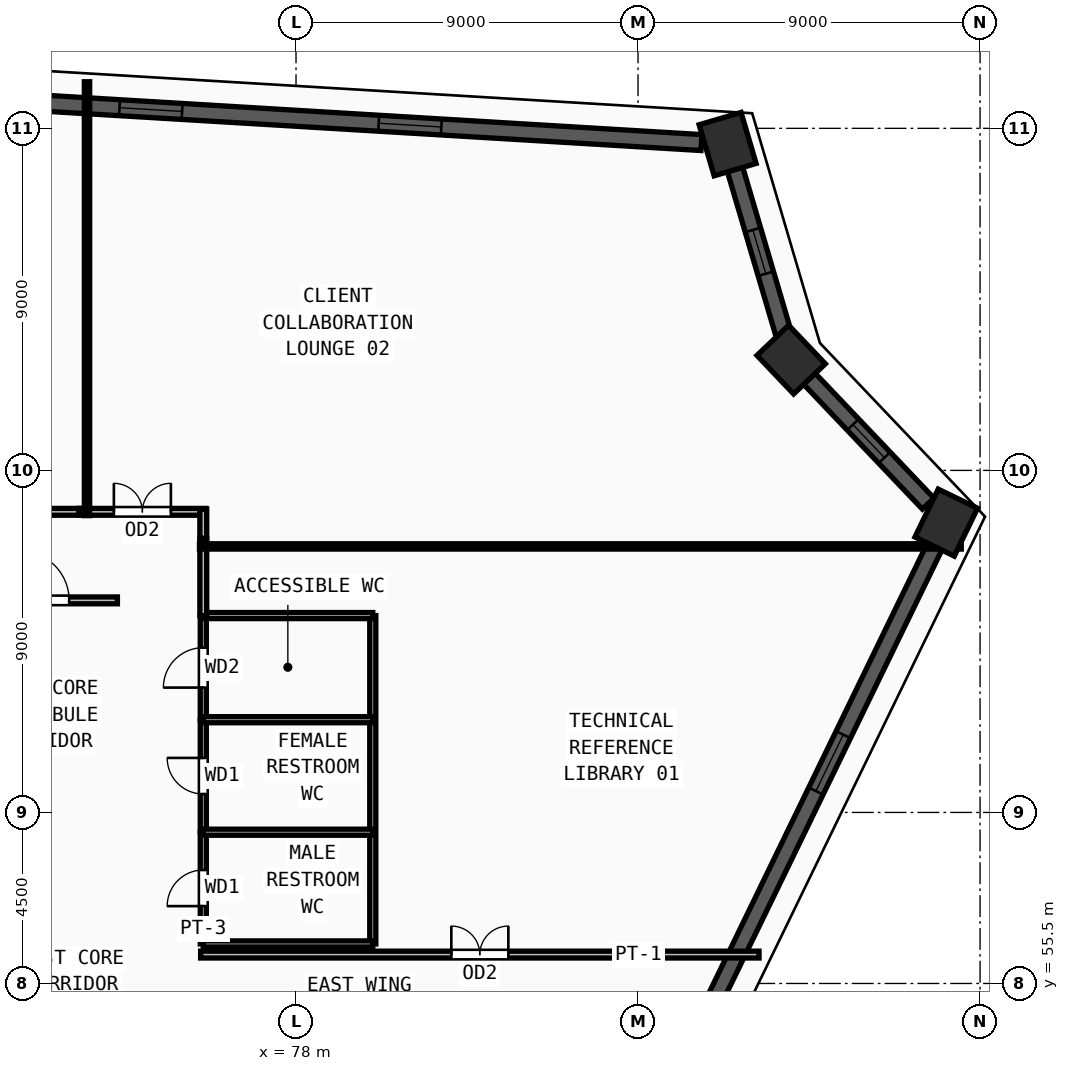
"""IFC4 building model, lengths in metres.
Left out: names, types, materials, properties, quantities, classifications, styles, units other than length and angle.
Written with IfcOpenShell. Run it as: python <this file> out.ifc"""

import sys

from ifc_helpers import new_model, si_unit, direction, frame, frame_2d, origin, origin_2d, place, context, subcontext, project, spatial, rectangle, extrude, source, transform, mapped, element, fill, save


model = new_model("IFC4")
c1 = context("Model", 3, precision=1e-05, world=origin(), true_north=direction((0.0, 1.0)))
c2 = subcontext(c1, "Body", "Model", "MODEL_VIEW")
j1 = project(units=[si_unit("LENGTHUNIT", "METRE"), si_unit("PLANEANGLEUNIT", "RADIAN")], contexts=[c1])
p1 = place(None, origin())
s1 = spatial("IfcSite", under=j1, at=p1, CompositionType="ELEMENT")
p2 = place(p1, origin())
s2 = spatial("IfcBuilding", under=s1, at=p2, CompositionType="ELEMENT")
p3 = place(p2, frame((0.0, 0.0, 155.25)))
s3 = spatial("IfcBuildingStorey", under=s2, at=p3, CompositionType="ELEMENT", Elevation=155.25)
m1 = source(origin(), c2, "Body", "SweptSolid", [
    extrude(rectangle(XDim=1.4, YDim=1.15, at=origin_2d()), origin(), (0.0, 0.0, 1.0), 3.75),
])
for number, where, z_axis, x_axis in (
    (1, (89.357, 77.585, 0.0), (0.0, 0.0, 1.0), (-0.283, 0.959, 0.0)),
    (2, (91.029, 71.915, 0.0), (0.0, 0.0, 1.0), (-0.689, 0.724, 0.0)),
    (3, (95.11, 67.626, 0.0), (0.0, 0.0, 1.0), (0.437, 0.9, 0.0)),
):
    element("IfcColumn", number, at=place(p3, frame(where, z_axis=z_axis, x_axis=x_axis)), inside=s3, PredefinedType="COLUMN", context=c2, shape_type="MappedRepresentation", body=[
        mapped(m1, transform((0.0, 0.0, 0.0), x_axis=(1.0, 0.0, 0.0), y_axis=(0.0, 1.0, 0.0), z_axis=(0.0, 0.0, 1.0), scale=1.0)),
    ])
p4 = place(p3, frame((83.737, 44.203, 0.0), z_axis=(0.0, 0.0, 1.0), x_axis=(0.436800646479, 0.899558333426, 0.0)))
e4 = element("IfcWall", 4, at=p4, inside=s3, PredefinedType="SOLIDWALL", context=c2, shape_type="SweptSolid", body=[
    extrude(rectangle(XDim=25.348, YDim=0.42, at=frame_2d((12.674, 0.0))), origin(), (0.0, 0.0, 1.0), 3.57),
])
m2 = source(origin(), c2, "Body", "SweptSolid", [
    extrude(rectangle(XDim=1.65, YDim=1.95, at=frame_2d((0.825, 0.975))), frame((0.0, 0.22, 0.0), z_axis=(0.0, -1.0, 0.0), x_axis=(1.0, 0.0, 0.0)), (0.0, 0.0, 1.0), 0.44),
])
p5 = place(p4, frame((5.512, 0.0, 0.55)))
e5 = element("IfcOpeningElement", 5, at=p5, cuts=e4, PredefinedType="OPENING", context=c2, shape_type="MappedRepresentation", body=[
    mapped(m2, transform((0.0, 0.0, 0.0), x_axis=(1.0, 0.0, 0.0), y_axis=(0.0, 1.0, 0.0), z_axis=(0.0, 0.0, 1.0), scale=1.0)),
])
p6 = place(p4, frame((18.186, 0.0, 0.55)))
e6 = element("IfcOpeningElement", 6, at=p6, cuts=e4, PredefinedType="OPENING", context=c2, shape_type="MappedRepresentation", body=[
    mapped(m2, transform((0.0, 0.0, 0.0), x_axis=(1.0, 0.0, 0.0), y_axis=(0.0, 1.0, 0.0), z_axis=(0.0, 0.0, 1.0), scale=1.0)),
])
p7 = place(p3, frame((94.634, 68.126, 0.0), z_axis=(0.0, 0.0, 1.0), x_axis=(-0.68927504917, 0.724499763003, 0.0)))
e7 = element("IfcWall", 7, at=p7, inside=s3, PredefinedType="SOLIDWALL", context=c2, shape_type="SweptSolid", body=[
    extrude(rectangle(XDim=4.54, YDim=0.42, at=frame_2d((2.27, 0.0))), origin(), (0.0, 0.0, 1.0), 3.57),
])
m3 = source(origin(), c2, "Body", "SweptSolid", [
    extrude(rectangle(XDim=1.2, YDim=1.9, at=frame_2d((0.6, 0.95))), frame((0.0, 0.22, 0.0), z_axis=(0.0, -1.0, 0.0), x_axis=(1.0, 0.0, 0.0)), (0.0, 0.0, 1.0), 0.44),
])
p8 = place(p7, frame((1.67, 0.0, 0.55)))
e8 = element("IfcOpeningElement", 8, at=p8, cuts=e7, PredefinedType="OPENING", context=c2, shape_type="MappedRepresentation", body=[
    mapped(m3, transform((0.0, 0.0, 0.0), x_axis=(1.0, 0.0, 0.0), y_axis=(0.0, 1.0, 0.0), z_axis=(0.0, 0.0, 1.0), scale=1.0)),
])
p9 = place(p3, frame((90.834, 72.577, 0.0), z_axis=(0.0, 0.0, 1.0), x_axis=(-0.282915903715, 0.959144718708, 0.0)))
e9 = element("IfcWall", 9, at=p9, inside=s3, PredefinedType="SOLIDWALL", context=c2, shape_type="SweptSolid", body=[
    extrude(rectangle(XDim=4.531, YDim=0.42, at=frame_2d((2.266, 0.0))), origin(), (0.0, 0.0, 1.0), 3.57),
])
p10 = place(p9, frame((1.666, 0.0, 0.55)))
e10 = element("IfcOpeningElement", 10, at=p10, cuts=e9, PredefinedType="OPENING", context=c2, shape_type="MappedRepresentation", body=[
    mapped(m3, transform((0.0, 0.0, 0.0), x_axis=(1.0, 0.0, 0.0), y_axis=(0.0, 1.0, 0.0), z_axis=(0.0, 0.0, 1.0), scale=1.0)),
])
p11 = place(p3, frame((88.668, 77.626, 0.0), z_axis=(0.0, 0.0, 1.0), x_axis=(-0.998209336024, 0.059817401095, 0.0)))
e11 = element("IfcWall", 11, at=p11, inside=s3, PredefinedType="SOLIDWALL", context=c2, shape_type="SweptSolid", body=[
    extrude(rectangle(XDim=30.729, YDim=0.42, at=frame_2d((15.365, 0.0))), origin(), (0.0, 0.0, 1.0), 3.57),
])
p12 = place(p11, frame((6.857, 0.0, 0.55)))
e12 = element("IfcOpeningElement", 12, at=p12, cuts=e11, PredefinedType="OPENING", context=c2, shape_type="MappedRepresentation", body=[
    mapped(m2, transform((0.0, 0.0, 0.0), x_axis=(1.0, 0.0, 0.0), y_axis=(0.0, 1.0, 0.0), z_axis=(0.0, 0.0, 1.0), scale=1.0)),
])
p13 = place(p11, frame((13.69, 0.0, 0.55)))
e13 = element("IfcOpeningElement", 13, at=p13, cuts=e11, PredefinedType="OPENING", context=c2, shape_type="MappedRepresentation", body=[
    mapped(m2, transform((0.0, 0.0, 0.0), x_axis=(1.0, 0.0, 0.0), y_axis=(0.0, 1.0, 0.0), z_axis=(0.0, 0.0, 1.0), scale=1.0)),
])
p14 = place(p11, frame((20.672, 0.0, 0.55)))
e14 = element("IfcOpeningElement", 14, at=p14, cuts=e11, PredefinedType="OPENING", context=c2, shape_type="MappedRepresentation", body=[
    mapped(m2, transform((0.0, 0.0, 0.0), x_axis=(1.0, 0.0, 0.0), y_axis=(0.0, 1.0, 0.0), z_axis=(0.0, 0.0, 1.0), scale=1.0)),
])
p15 = place(p3, frame((75.56, 56.54, 0.0), z_axis=(0.0, 0.0, 1.0), x_axis=(0.0, 1.0, 0.0)))
e15 = element("IfcWall", 15, at=p15, inside=s3, PredefinedType="PARTITIONING", context=c2, shape_type="SweptSolid", body=[
    extrude(rectangle(XDim=2.94, YDim=0.16, at=frame_2d((1.47, 0.0))), origin(), (0.0, 0.0, 1.0), 3.57),
])
m4 = source(origin(), c2, "Body", "SweptSolid", [
    extrude(rectangle(XDim=0.95, YDim=2.15, at=frame_2d((0.475, 1.075))), frame((0.0, 0.09, 0.0), z_axis=(0.0, -1.0, 0.0), x_axis=(1.0, 0.0, 0.0)), (0.0, 0.0, 1.0), 0.18),
])
p16 = place(p15, frame((0.995, 0.0, 0.0)))
e16 = element("IfcOpeningElement", 16, at=p16, cuts=e15, PredefinedType="OPENING", context=c2, shape_type="MappedRepresentation", body=[
    mapped(m4, transform((0.0, 0.0, 0.0), x_axis=(1.0, 0.0, 0.0), y_axis=(0.0, 1.0, 0.0), z_axis=(0.0, 0.0, 1.0), scale=1.0)),
])
p17 = place(p3, frame((75.56, 59.48, 0.0), z_axis=(0.0, 0.0, 1.0), x_axis=(0.0, 1.0, 0.0)))
e17 = element("IfcWall", 17, at=p17, inside=s3, PredefinedType="PARTITIONING", context=c2, shape_type="SweptSolid", body=[
    extrude(rectangle(XDim=2.96, YDim=0.16, at=frame_2d((1.48, 0.0))), origin(), (0.0, 0.0, 1.0), 3.57),
])
p18 = place(p17, frame((1.005, 0.0, 0.0)))
e18 = element("IfcOpeningElement", 18, at=p18, cuts=e17, PredefinedType="OPENING", context=c2, shape_type="MappedRepresentation", body=[
    mapped(m4, transform((0.0, 0.0, 0.0), x_axis=(1.0, 0.0, 0.0), y_axis=(0.0, 1.0, 0.0), z_axis=(0.0, 0.0, 1.0), scale=1.0)),
])
p19 = place(p3, frame((75.56, 62.44, 0.0), z_axis=(0.0, 0.0, 1.0), x_axis=(0.0, 1.0, 0.0)))
e19 = element("IfcWall", 19, at=p19, inside=s3, PredefinedType="PARTITIONING", context=c2, shape_type="SweptSolid", body=[
    extrude(rectangle(XDim=2.74, YDim=0.16, at=frame_2d((1.37, 0.0))), origin(), (0.0, 0.0, 1.0), 3.57),
])
m5 = source(origin(), c2, "Body", "SweptSolid", [
    extrude(rectangle(XDim=1.05, YDim=2.15, at=frame_2d((0.525, 1.075))), frame((0.0, 0.09, 0.0), z_axis=(0.0, -1.0, 0.0), x_axis=(1.0, 0.0, 0.0)), (0.0, 0.0, 1.0), 0.18),
])
p20 = place(p19, frame((0.845, 0.0, 0.0)))
e20 = element("IfcOpeningElement", 20, at=p20, cuts=e19, PredefinedType="OPENING", context=c2, shape_type="MappedRepresentation", body=[
    mapped(m5, transform((0.0, 0.0, 0.0), x_axis=(1.0, 0.0, 0.0), y_axis=(0.0, 1.0, 0.0), z_axis=(0.0, 0.0, 1.0), scale=1.0)),
])
p21 = place(p3, frame((69.46, 65.58, 0.0), z_axis=(0.0, 0.0, 1.0), x_axis=(1.0, 0.0, 0.0)))
e21 = element("IfcWall", 21, at=p21, inside=s3, PredefinedType="PARTITIONING", context=c2, shape_type="SweptSolid", body=[
    extrude(rectangle(XDim=3.84, YDim=0.18, at=frame_2d((1.92, 0.0))), origin(), (0.0, 0.0, 1.0), 3.57),
])
m6 = source(origin(), c2, "Body", "SweptSolid", [
    extrude(rectangle(XDim=1.3, YDim=2.2, at=frame_2d((0.65, 1.1))), frame((0.0, 0.1, 0.0), z_axis=(0.0, -1.0, 0.0), x_axis=(1.0, 0.0, 0.0)), (0.0, 0.0, 1.0), 0.2),
])
p22 = place(p21, frame((1.27, 0.0, 0.0)))
e22 = element("IfcOpeningElement", 22, at=p22, cuts=e21, PredefinedType="OPENING", context=c2, shape_type="MappedRepresentation", body=[
    mapped(m6, transform((0.0, 0.0, 0.0), x_axis=(1.0, 0.0, 0.0), y_axis=(0.0, 1.0, 0.0), z_axis=(0.0, 0.0, 1.0), scale=1.0)),
])
p23 = place(p3, frame((75.49, 56.26, 0.0), z_axis=(0.0, 0.0, 1.0), x_axis=(1.0, 0.0, 0.0)))
e23 = element("IfcWall", 23, at=p23, inside=s3, PredefinedType="PARTITIONING", context=c2, shape_type="SweptSolid", body=[
    extrude(rectangle(XDim=14.694, YDim=0.18, at=frame_2d((7.347, 0.0))), origin(), (0.0, 0.0, 1.0), 3.57),
])
m7 = source(origin(), c2, "Body", "SweptSolid", [
    extrude(rectangle(XDim=1.5, YDim=2.2, at=frame_2d((0.75, 1.1))), frame((0.0, 0.1, 0.0), z_axis=(0.0, -1.0, 0.0), x_axis=(1.0, 0.0, 0.0)), (0.0, 0.0, 1.0), 0.2),
])
p24 = place(p23, frame((6.597, 0.0, 0.0)))
e24 = element("IfcOpeningElement", 24, at=p24, cuts=e23, PredefinedType="OPENING", context=c2, shape_type="MappedRepresentation", body=[
    mapped(m7, transform((0.0, 0.0, 0.0), x_axis=(1.0, 0.0, 0.0), y_axis=(0.0, 1.0, 0.0), z_axis=(0.0, 0.0, 1.0), scale=1.0)),
])
p25 = place(p3, frame((72.285, 67.91, 0.0), z_axis=(0.0, 0.0, 1.0), x_axis=(1.0, 0.0, 0.0)))
e25 = element("IfcWall", 25, at=p25, inside=s3, PredefinedType="PARTITIONING", context=c2, shape_type="SweptSolid", body=[
    extrude(rectangle(XDim=3.345, YDim=0.18, at=frame_2d((1.672, 0.0))), origin(), (0.0, 0.0, 1.0), 3.57),
])
p26 = place(p25, frame((0.922, 0.0, 0.0)))
e26 = element("IfcOpeningElement", 26, at=p26, cuts=e25, PredefinedType="OPENING", context=c2, shape_type="MappedRepresentation", body=[
    mapped(m7, transform((0.0, 0.0, 0.0), x_axis=(1.0, 0.0, 0.0), y_axis=(0.0, 1.0, 0.0), z_axis=(0.0, 0.0, 1.0), scale=1.0)),
])
p27 = place(p3, frame((65.285, 67.91, 0.0), z_axis=(0.0, 0.0, 1.0), x_axis=(1.0, 0.0, 0.0)))
e27 = element("IfcWall", 27, at=p27, inside=s3, PredefinedType="PARTITIONING", context=c2, shape_type="SweptSolid", body=[
    extrude(rectangle(XDim=7.0, YDim=0.18, at=frame_2d((3.5, 0.0))), origin(), (0.0, 0.0, 1.0), 3.57),
])
m8 = source(origin(), c2, "Body", "SweptSolid", [
    extrude(rectangle(XDim=1.0, YDim=2.2, at=frame_2d((0.5, 1.1))), frame((0.0, 0.1, 0.0), z_axis=(0.0, -1.0, 0.0), x_axis=(1.0, 0.0, 0.0)), (0.0, 0.0, 1.0), 0.2),
])
p28 = place(p27, frame((3.0, 0.0, 0.0)))
e28 = element("IfcOpeningElement", 28, at=p28, cuts=e27, PredefinedType="OPENING", context=c2, shape_type="MappedRepresentation", body=[
    mapped(m8, transform((0.0, 0.0, 0.0), x_axis=(1.0, 0.0, 0.0), y_axis=(0.0, 1.0, 0.0), z_axis=(0.0, 0.0, 1.0), scale=1.0)),
])
p29 = place(p3, frame((80.02, 56.54, 0.0), z_axis=(0.0, 0.0, 1.0), x_axis=(0.0, 1.0, 0.0)))
e29 = element("IfcWall", 29, at=p29, inside=s3, PredefinedType="PARTITIONING", context=c2, shape_type="SweptSolid", body=[
    extrude(rectangle(XDim=8.64, YDim=0.16, at=frame_2d((4.32, 0.0))), origin(), (0.0, 0.0, 1.0), 3.57),
])
for number, where, z_axis, x_axis in (
    (30, (75.56, 56.54, 0.0), (0.0, 0.0, 1.0), (1.0, 0.0, 0.0)),
    (31, (75.56, 59.48, 0.0), (0.0, 0.0, 1.0), (1.0, 0.0, 0.0)),
    (32, (75.56, 62.44, 0.0), (0.0, 0.0, 1.0), (1.0, 0.0, 0.0)),
    (33, (75.56, 65.18, 0.0), (0.0, 0.0, 1.0), (1.0, 0.0, 0.0)),
):
    element("IfcWall", number, at=place(p3, frame(where, z_axis=z_axis, x_axis=x_axis)), inside=s3, PredefinedType="PARTITIONING", context=c2, shape_type="SweptSolid", body=[
        extrude(rectangle(XDim=4.46, YDim=0.16, at=frame_2d((2.23, 0.0))), origin(), (0.0, 0.0, 1.0), 3.57),
    ])
p30 = place(p3, frame((75.56, 67.215, 0.0), z_axis=(0.0, 0.0, 1.0), x_axis=(0.0, -1.0, 0.0)))
e34 = element("IfcWall", 34, at=p30, inside=s3, PredefinedType="PARTITIONING", context=c2, shape_type="SweptSolid", body=[
    extrude(rectangle(XDim=2.035, YDim=0.18, at=frame_2d((1.018, 0.0))), origin(), (0.0, 0.0, 1.0), 3.57),
])
p31 = place(p3, frame((75.56, 67.98, 0.0), z_axis=(0.0, 0.0, 1.0), x_axis=(0.0, -1.0, 0.0)))
e35 = element("IfcWall", 35, at=p31, inside=s3, PredefinedType="PARTITIONING", context=c2, shape_type="SweptSolid", body=[
    extrude(rectangle(XDim=0.765, YDim=0.18, at=frame_2d((0.382, 0.0))), origin(), (0.0, 0.0, 1.0), 3.57),
])
p32 = place(p3, frame((75.46, 67.0, 0.0), z_axis=(0.0, 0.0, 1.0), x_axis=(1.0, 0.0, 0.0)))
e36 = element("IfcWall", 36, at=p32, inside=s3, PredefinedType="PARTITIONING", context=c2, shape_type="SweptSolid", body=[
    extrude(rectangle(XDim=20.046, YDim=0.14, at=frame_2d((10.023, 0.0))), origin(), (0.0, 0.0, 1.0), 2.755),
])
p33 = place(p3, frame((72.5, 67.81, 0.0), z_axis=(0.0, 0.0, 1.0), x_axis=(0.0, 1.0, 0.0)))
e37 = element("IfcWall", 37, at=p33, inside=s3, PredefinedType="PARTITIONING", context=c2, shape_type="SweptSolid", body=[
    extrude(rectangle(XDim=11.416, YDim=0.14, at=frame_2d((5.708, 0.0))), origin(), (0.0, 0.0, 1.0), 3.57),
])
m9 = source(origin(), c2, "Body", "SweptSolid", [
    extrude(rectangle(XDim=1.65, YDim=1.95, at=frame_2d((0.825, 0.975))), frame((0.0, 0.03, 0.0), z_axis=(0.0, -1.0, 0.0), x_axis=(1.0, 0.0, 0.0)), (0.0, 0.0, 1.0), 0.06),
])
p34 = place(p6, origin())
e38 = element("IfcWindow", 38, at=p34, inside=s3, PartitioningType="DOUBLE_PANEL_VERTICAL", PredefinedType="WINDOW", context=c2, shape_type="MappedRepresentation", body=[
    mapped(m9, transform((0.0, 0.0, 0.0), x_axis=(1.0, 0.0, 0.0), y_axis=(0.0, 1.0, 0.0), z_axis=(0.0, 0.0, 1.0), scale=1.0)),
])
fill(e6, e38)
m10 = source(origin(), c2, "Body", "SweptSolid", [
    extrude(rectangle(XDim=1.2, YDim=1.9, at=frame_2d((0.6, 0.95))), frame((0.0, 0.03, 0.0), z_axis=(0.0, -1.0, 0.0), x_axis=(1.0, 0.0, 0.0)), (0.0, 0.0, 1.0), 0.06),
])
p35 = place(p8, origin())
e39 = element("IfcWindow", 39, at=p35, inside=s3, PartitioningType="SINGLE_PANEL", PredefinedType="WINDOW", context=c2, shape_type="MappedRepresentation", body=[
    mapped(m10, transform((0.0, 0.0, 0.0), x_axis=(1.0, 0.0, 0.0), y_axis=(0.0, 1.0, 0.0), z_axis=(0.0, 0.0, 1.0), scale=1.0)),
])
fill(e8, e39)
p36 = place(p10, origin())
e40 = element("IfcWindow", 40, at=p36, inside=s3, PartitioningType="SINGLE_PANEL", PredefinedType="WINDOW", context=c2, shape_type="MappedRepresentation", body=[
    mapped(m10, transform((0.0, 0.0, 0.0), x_axis=(1.0, 0.0, 0.0), y_axis=(0.0, 1.0, 0.0), z_axis=(0.0, 0.0, 1.0), scale=1.0)),
])
fill(e10, e40)
p37 = place(p12, origin())
e41 = element("IfcWindow", 41, at=p37, inside=s3, PartitioningType="DOUBLE_PANEL_VERTICAL", PredefinedType="WINDOW", context=c2, shape_type="MappedRepresentation", body=[
    mapped(m9, transform((0.0, 0.0, 0.0), x_axis=(1.0, 0.0, 0.0), y_axis=(0.0, 1.0, 0.0), z_axis=(0.0, 0.0, 1.0), scale=1.0)),
])
fill(e12, e41)
p38 = place(p13, origin())
e42 = element("IfcWindow", 42, at=p38, inside=s3, PartitioningType="DOUBLE_PANEL_VERTICAL", PredefinedType="WINDOW", context=c2, shape_type="MappedRepresentation", body=[
    mapped(m9, transform((0.0, 0.0, 0.0), x_axis=(1.0, 0.0, 0.0), y_axis=(0.0, 1.0, 0.0), z_axis=(0.0, 0.0, 1.0), scale=1.0)),
])
fill(e13, e42)
m11 = source(origin(), c2, "Body", "SweptSolid", [
    extrude(rectangle(XDim=0.95, YDim=2.15, at=frame_2d((0.475, 1.075))), frame((0.0, 0.025, 0.0), z_axis=(0.0, -1.0, 0.0), x_axis=(1.0, 0.0, 0.0)), (0.0, 0.0, 1.0), 0.05),
])
p39 = place(p16, origin())
e43 = element("IfcDoor", 43, at=p39, inside=s3, OperationType="SINGLE_SWING_LEFT", PredefinedType="DOOR", context=c2, shape_type="MappedRepresentation", body=[
    mapped(m11, transform((0.0, 0.0, 0.0), x_axis=(1.0, 0.0, 0.0), y_axis=(0.0, 1.0, 0.0), z_axis=(0.0, 0.0, 1.0), scale=1.0)),
])
fill(e16, e43)
p40 = place(p18, origin())
e44 = element("IfcDoor", 44, at=p40, inside=s3, OperationType="SINGLE_SWING_RIGHT", PredefinedType="DOOR", context=c2, shape_type="MappedRepresentation", body=[
    mapped(m11, transform((0.0, 0.0, 0.0), x_axis=(1.0, 0.0, 0.0), y_axis=(0.0, 1.0, 0.0), z_axis=(0.0, 0.0, 1.0), scale=1.0)),
])
fill(e18, e44)
m12 = source(origin(), c2, "Body", "SweptSolid", [
    extrude(rectangle(XDim=1.05, YDim=2.15, at=frame_2d((0.525, 1.075))), frame((0.0, 0.025, 0.0), z_axis=(0.0, -1.0, 0.0), x_axis=(1.0, 0.0, 0.0)), (0.0, 0.0, 1.0), 0.05),
])
p41 = place(p20, origin())
e45 = element("IfcDoor", 45, at=p41, inside=s3, OperationType="SINGLE_SWING_LEFT", PredefinedType="DOOR", context=c2, shape_type="MappedRepresentation", body=[
    mapped(m12, transform((0.0, 0.0, 0.0), x_axis=(1.0, 0.0, 0.0), y_axis=(0.0, 1.0, 0.0), z_axis=(0.0, 0.0, 1.0), scale=1.0)),
])
fill(e20, e45)
m13 = source(origin(), c2, "Body", "SweptSolid", [
    extrude(rectangle(XDim=1.3, YDim=2.2, at=frame_2d((0.65, 1.1))), frame((0.0, 0.025, 0.0), z_axis=(0.0, -1.0, 0.0), x_axis=(1.0, 0.0, 0.0)), (0.0, 0.0, 1.0), 0.05),
])
p42 = place(p22, origin())
e46 = element("IfcDoor", 46, at=p42, inside=s3, OperationType="SINGLE_SWING_LEFT", PredefinedType="DOOR", context=c2, shape_type="MappedRepresentation", body=[
    mapped(m13, transform((0.0, 0.0, 0.0), x_axis=(1.0, 0.0, 0.0), y_axis=(0.0, 1.0, 0.0), z_axis=(0.0, 0.0, 1.0), scale=1.0)),
])
fill(e22, e46)
m14 = source(origin(), c2, "Body", "SweptSolid", [
    extrude(rectangle(XDim=1.5, YDim=2.2, at=frame_2d((0.75, 1.1))), frame((0.0, 0.025, 0.0), z_axis=(0.0, -1.0, 0.0), x_axis=(1.0, 0.0, 0.0)), (0.0, 0.0, 1.0), 0.05),
])
p43 = place(p24, origin())
e47 = element("IfcDoor", 47, at=p43, inside=s3, OperationType="DOUBLE_DOOR_SINGLE_SWING", PredefinedType="DOOR", context=c2, shape_type="MappedRepresentation", body=[
    mapped(m14, transform((0.0, 0.0, 0.0), x_axis=(1.0, 0.0, 0.0), y_axis=(0.0, 1.0, 0.0), z_axis=(0.0, 0.0, 1.0), scale=1.0)),
])
fill(e24, e47)
p44 = place(p26, origin())
e48 = element("IfcDoor", 48, at=p44, inside=s3, OperationType="DOUBLE_DOOR_SINGLE_SWING", PredefinedType="DOOR", context=c2, shape_type="MappedRepresentation", body=[
    mapped(m14, transform((0.0, 0.0, 0.0), x_axis=(1.0, 0.0, 0.0), y_axis=(0.0, 1.0, 0.0), z_axis=(0.0, 0.0, 1.0), scale=1.0)),
])
fill(e26, e48)
save(model, sys.argv[1])
